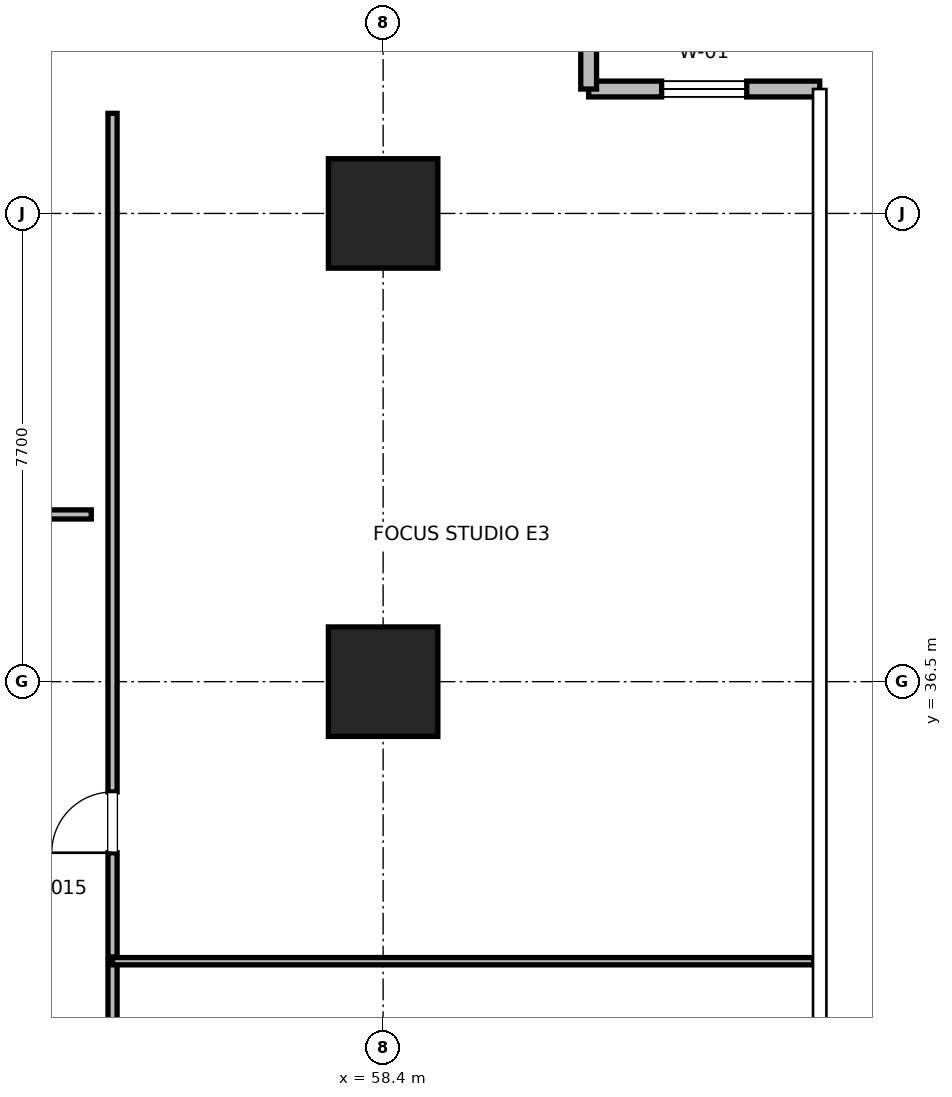
"""IFC4 building model, lengths in metres.
Left out: names, types, materials, properties, quantities, classifications, styles, units other than length and angle.
Written with IfcOpenShell. Run it as: python <this file> out.ifc"""

import sys

from ifc_helpers import new_model, si_unit, direction, frame, frame_2d, origin, origin_2d, place, context, subcontext, project, spatial, rectangle, extrude, element, fill, save


model = new_model("IFC4")
c1 = context("Model", 3, precision=1e-05, world=origin(), true_north=direction((0.0, 1.0)))
c2 = subcontext(c1, "Body", "Model", "MODEL_VIEW")
j1 = project(units=[si_unit("LENGTHUNIT", "METRE"), si_unit("PLANEANGLEUNIT", "RADIAN")], contexts=[c1])
p1 = place(None, origin())
s1 = spatial("IfcSite", under=j1, at=p1, CompositionType="ELEMENT")
p2 = place(p1, origin())
s2 = spatial("IfcBuilding", under=s1, at=p2, CompositionType="ELEMENT")
p3 = place(p2, frame((0.0, 0.0, 51.6)))
s3 = spatial("IfcBuildingStorey", under=s2, at=p3, CompositionType="ELEMENT", Elevation=51.6)
for number, where, z_axis, x_axis in (
    (1, (58.4, 36.5, 0.0), (0.0, 0.0, 1.0), (1.0, 0.0, 0.0)),
    (2, (58.4, 44.2, 0.0), (0.0, 0.0, 1.0), (1.0, 0.0, 0.0)),
):
    element("IfcColumn", number, at=place(p3, frame(where, z_axis=z_axis, x_axis=x_axis)), inside=s3, PredefinedType="COLUMN", context=c2, shape_type="SweptSolid", body=[
        extrude(rectangle(XDim=1.8, YDim=1.8, at=origin_2d()), origin(), (0.0, 0.0, 1.0), 4.0),
    ])
p4 = place(p3, frame((65.58, 46.246, 0.0), z_axis=(0.0, 0.0, 1.0), x_axis=(-1.0, 0.0, 0.0)))
e3 = element("IfcWall", 3, at=p4, inside=s3, PredefinedType="PARAPET", context=c2, shape_type="SweptSolid", body=[
    extrude(rectangle(XDim=3.8, YDim=0.26, at=frame_2d((1.9, 0.0))), origin(), (0.0, 0.0, 1.0), 3.76),
])
p5 = place(p4, frame((1.2, 0.0, 0.85)))
e4 = element("IfcOpeningElement", 4, at=p5, cuts=e3, PredefinedType="OPENING", context=c2, shape_type="SweptSolid", body=[
    extrude(rectangle(XDim=1.4, YDim=2.0, at=frame_2d((0.7, 1.0))), frame((0.0, 0.13, 0.0), z_axis=(0.0, -1.0, 0.0), x_axis=(1.0, 0.0, 0.0)), (0.0, 0.0, 1.0), 0.26),
])
p6 = place(p3, frame((61.78, 46.246, 0.0), z_axis=(0.0, 0.0, 1.0), x_axis=(0.0, 1.0, 0.0)))
e5 = element("IfcWall", 5, at=p6, inside=s3, PredefinedType="PARAPET", context=c2, shape_type="SweptSolid", body=[
    extrude(rectangle(XDim=3.4, YDim=0.26, at=frame_2d((1.7, 0.0))), origin(), (0.0, 0.0, 1.0), 3.76),
])
p7 = place(p3, frame((46.87, 39.25, 0.0), z_axis=(0.0, 0.0, 1.0), x_axis=(1.0, 0.0, 0.0)))
e6 = element("IfcWall", 6, at=p7, inside=s3, PredefinedType="PARTITIONING", context=c2, shape_type="SweptSolid", body=[
    extrude(rectangle(XDim=6.73, YDim=0.15, at=frame_2d((3.365, 0.0))), origin(), (0.0, 0.0, 1.0), 2.85),
])
p8 = place(p7, frame((2.815, 0.0, 0.0)))
e7 = element("IfcOpeningElement", 7, at=p8, cuts=e6, PredefinedType="OPENING", context=c2, shape_type="SweptSolid", body=[
    extrude(rectangle(XDim=1.0, YDim=2.15, at=frame_2d((0.5, 1.075))), frame((0.0, 0.075, 0.0), z_axis=(0.0, -1.0, 0.0), x_axis=(1.0, 0.0, 0.0)), (0.0, 0.0, 1.0), 0.15),
])
p9 = place(p3, frame((53.95, 19.498, 0.0), z_axis=(0.0, 0.0, 1.0), x_axis=(0.0, 1.0, 0.0)))
e8 = element("IfcWall", 8, at=p9, inside=s3, PredefinedType="PARTITIONING", context=c2, shape_type="SweptSolid", body=[
    extrude(rectangle(XDim=12.405, YDim=0.15, at=frame_2d((6.203, 0.0))), origin(), (0.0, 0.0, 1.0), 2.85),
])
p10 = place(p9, frame((5.668, 0.0, 0.0)))
e9 = element("IfcOpeningElement", 9, at=p10, cuts=e8, PredefinedType="OPENING", context=c2, shape_type="SweptSolid", body=[
    extrude(rectangle(XDim=1.0, YDim=2.15, at=frame_2d((0.5, 1.075))), frame((0.0, 0.075, 0.0), z_axis=(0.0, -1.0, 0.0), x_axis=(1.0, 0.0, 0.0)), (0.0, 0.0, 1.0), 0.15),
])
p11 = place(p3, frame((53.95, 31.903, 0.0), z_axis=(0.0, 0.0, 1.0), x_axis=(1.0, 0.0, 0.0)))
e10 = element("IfcWall", 10, at=p11, inside=s3, PredefinedType="PARTITIONING", context=c2, shape_type="SweptSolid", body=[
    extrude(rectangle(XDim=11.53, YDim=0.12, at=frame_2d((5.765, 0.0))), origin(), (0.0, 0.0, 1.0), 2.85),
])
p12 = place(p3, frame((53.95, 31.973, 0.0), z_axis=(0.0, 0.0, 1.0), x_axis=(0.0, 1.0, 0.0)))
e11 = element("IfcWall", 11, at=p12, inside=s3, PredefinedType="PARTITIONING", context=c2, shape_type="SweptSolid", body=[
    extrude(rectangle(XDim=13.873, YDim=0.15, at=frame_2d((6.937, 0.0))), origin(), (0.0, 0.0, 1.0), 2.85),
])
p13 = place(p12, frame((1.713, 0.0, 0.0)))
e12 = element("IfcOpeningElement", 12, at=p13, cuts=e11, PredefinedType="OPENING", context=c2, shape_type="SweptSolid", body=[
    extrude(rectangle(XDim=1.0, YDim=2.15, at=frame_2d((0.5, 1.075))), frame((0.0, 0.075, 0.0), z_axis=(0.0, -1.0, 0.0), x_axis=(1.0, 0.0, 0.0)), (0.0, 0.0, 1.0), 0.15),
])
p14 = place(p5, origin())
e13 = element("IfcWindow", 13, at=p14, inside=s3, PartitioningType="SINGLE_PANEL", PredefinedType="WINDOW", context=c2, shape_type="SweptSolid", body=[
    extrude(rectangle(XDim=1.4, YDim=2.0, at=frame_2d((0.7, 1.0))), frame((0.0, 0.03, 0.0), z_axis=(0.0, -1.0, 0.0), x_axis=(1.0, 0.0, 0.0)), (0.0, 0.0, 1.0), 0.06),
])
fill(e4, e13)
p15 = place(p13, origin())
e14 = element("IfcDoor", 14, at=p15, inside=s3, OperationType="SINGLE_SWING_LEFT", PredefinedType="DOOR", context=c2, shape_type="SweptSolid", body=[
    extrude(rectangle(XDim=1.0, YDim=2.15, at=frame_2d((0.5, 1.075))), frame((0.0, 0.025, 0.0), z_axis=(0.0, -1.0, 0.0), x_axis=(1.0, 0.0, 0.0)), (0.0, 0.0, 1.0), 0.05),
])
fill(e12, e14)
save(model, sys.argv[1])
